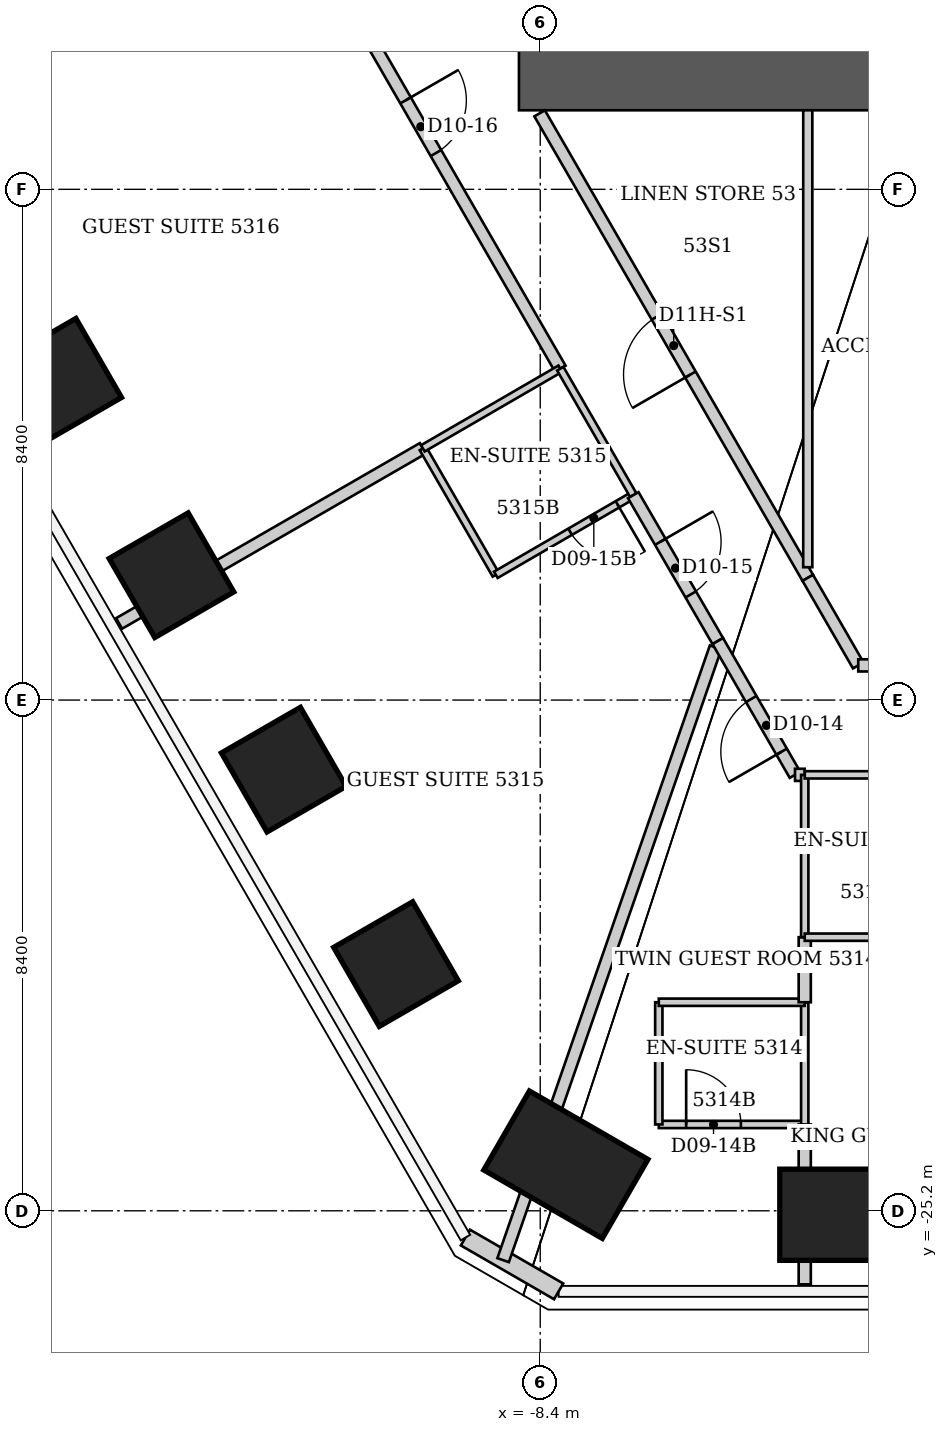
"""IFC4 building model, lengths in metres.
Left out: names, types, materials, properties, quantities, classifications, styles, units other than length and angle.
Written with IfcOpenShell. Run it as: python <this file> out.ifc"""

import sys

from ifc_helpers import new_model, si_unit, direction, frame, frame_2d, origin, origin_2d, place, context, subcontext, project, spatial, rectangle, extrude, element, fill, save


model = new_model("IFC4")
c1 = context("Model", 3, precision=1e-05, world=origin(), true_north=direction((0.0, 1.0)))
c2 = subcontext(c1, "Body", "Model", "MODEL_VIEW")
j1 = project(units=[si_unit("LENGTHUNIT", "METRE"), si_unit("PLANEANGLEUNIT", "RADIAN")], contexts=[c1])
p1 = place(None, origin())
s1 = spatial("IfcSite", under=j1, at=p1, CompositionType="ELEMENT")
p2 = place(p1, origin())
s2 = spatial("IfcBuilding", under=s1, at=p2, CompositionType="ELEMENT")
p3 = place(p2, frame((0.0, 0.0, 213.6)))
s3 = spatial("IfcBuildingStorey", under=s2, at=p3, CompositionType="ELEMENT", Elevation=213.6)
p4 = place(p3, frame((-3.71, -25.265, 0.0), z_axis=(0.0, 0.0, 1.0), x_axis=(0.0, -1.0, 0.0)))
e1 = element("IfcColumn", 1, at=p4, inside=s3, PredefinedType="COLUMN", context=c2, shape_type="SweptSolid", body=[
    extrude(rectangle(XDim=1.5, YDim=1.5, at=origin_2d()), origin(), (0.0, 0.0, 1.0), 3.8),
])
p5 = place(p3, frame((-7.979, -24.442, 0.0), z_axis=(0.0, 0.0, 1.0), x_axis=(-0.5, -0.866025403784, 0.0)))
e2 = element("IfcColumn", 2, at=p5, inside=s3, PredefinedType="COLUMN", context=c2, shape_type="SweptSolid", body=[
    extrude(rectangle(XDim=1.5, YDim=2.25, at=origin_2d()), origin(), (0.0, 0.0, 1.0), 3.8),
])
for number, where, z_axis, x_axis in (
    (3, (-10.772, -21.142, 0.0), (0.0, 0.0, 1.0), (-0.866, -0.5, 0.0)),
    (4, (-12.618, -17.945, 0.0), (0.0, 0.0, 1.0), (-0.866, -0.5, 0.0)),
    (5, (-14.465, -14.747, 0.0), (0.0, 0.0, 1.0), (-0.866, -0.5, 0.0)),
    (6, (-16.311, -11.549, 0.0), (0.0, 0.0, 1.0), (-0.866, -0.5, 0.0)),
):
    element("IfcColumn", number, at=place(p3, frame(where, z_axis=z_axis, x_axis=x_axis)), inside=s3, PredefinedType="COLUMN", context=c2, shape_type="SweptSolid", body=[
        extrude(rectangle(XDim=1.5, YDim=1.5, at=origin_2d()), origin(), (0.0, 0.0, 1.0), 3.8),
    ])
p6 = place(p3, frame((-8.75, -6.6, 0.0), z_axis=(0.0, 0.0, 1.0), x_axis=(1.0, 0.0, 0.0)))
e7 = element("IfcWall", 7, at=p6, inside=s3, PredefinedType="SHEAR", context=c2, shape_type="SweptSolid", body=[
    extrude(rectangle(XDim=17.5, YDim=1.0, at=frame_2d((8.75, 0.0))), origin(), (0.0, 0.0, 1.0), 3.8),
])
p7 = place(p3, frame((-8.097, -26.525, 0.0), z_axis=(0.0, 0.0, 1.0), x_axis=(-0.866036293601, 0.499981137809, 0.0)))
e8 = element("IfcWall", 8, at=p7, inside=s3, PredefinedType="SOLIDWALL", context=c2, shape_type="SweptSolid", body=[
    extrude(rectangle(XDim=1.77, YDim=0.3, at=frame_2d((0.885, 0.0))), origin(), (0.0, 0.0, 1.0), 3.64),
])
p8 = place(p3, frame((-15.326, -15.54, 0.0), z_axis=(0.0, 0.0, 1.0), x_axis=(0.866342721203, 0.499449986905, 0.0)))
e9 = element("IfcWall", 9, at=p8, inside=s3, PredefinedType="PARTITIONING", context=c2, shape_type="SweptSolid", body=[
    extrude(rectangle(XDim=5.767, YDim=0.2, at=frame_2d((2.883, 0.0))), origin(), (0.0, 0.0, 1.0), 3.64),
])
p9 = place(p3, frame((-12.66, -3.39, 0.0), z_axis=(0.0, 0.0, 1.0), x_axis=(0.499511590934, -0.866307203319, 0.0)))
e10 = element("IfcWall", 10, at=p9, inside=s3, PredefinedType="PARTITIONING", context=c2, shape_type="SweptSolid", body=[
    extrude(rectangle(XDim=9.189, YDim=0.2, at=frame_2d((4.594, 0.0))), origin(), (0.0, 0.0, 1.0), 3.64),
])
p10 = place(p9, frame((4.094, 0.0, 0.0)))
e11 = element("IfcOpeningElement", 11, at=p10, cuts=e10, PredefinedType="OPENING", context=c2, shape_type="SweptSolid", body=[
    extrude(rectangle(XDim=1.0, YDim=2.13, at=frame_2d((0.5, 1.065))), frame((0.0, 0.1, 0.0), z_axis=(0.0, -1.0, 0.0), x_axis=(1.0, 0.0, 0.0)), (0.0, 0.0, 1.0), 0.2),
])
p11 = place(p3, frame((-10.33, -12.66, 0.0), z_axis=(0.0, 0.0, 1.0), x_axis=(0.499693115345, -0.866202511239, 0.0)))
e12 = element("IfcWall", 12, at=p11, inside=s3, PredefinedType="PARTITIONING", context=c2, shape_type="SweptSolid", body=[
    extrude(rectangle(XDim=2.401, YDim=0.12, at=frame_2d((1.201, 0.0))), origin(), (0.0, 0.0, 1.0), 3.64),
])
p12 = place(p3, frame((-10.33, -12.66, 0.0), z_axis=(0.0, 0.0, 1.0), x_axis=(0.865195830568, 0.501434118073, 0.0)))
e13 = element("IfcWall", 13, at=p12, inside=s3, PredefinedType="PARTITIONING", context=c2, shape_type="SweptSolid", body=[
    extrude(rectangle(XDim=2.612, YDim=0.12, at=frame_2d((1.306, 0.0))), origin(), (0.0, 0.0, 1.0), 3.64),
])
p13 = place(p3, frame((-9.13, -14.74, 0.0), z_axis=(0.0, 0.0, 1.0), x_axis=(0.865131772832, 0.501544629755, 0.0)))
e14 = element("IfcWall", 14, at=p13, inside=s3, PredefinedType="PARTITIONING", context=c2, shape_type="SweptSolid", body=[
    extrude(rectangle(XDim=2.612, YDim=0.12, at=frame_2d((1.306, 0.0))), origin(), (0.0, 0.0, 1.0), 3.64),
])
p14 = place(p13, frame((1.412, 0.0, 0.0)))
e15 = element("IfcOpeningElement", 15, at=p14, cuts=e14, PredefinedType="OPENING", context=c2, shape_type="SweptSolid", body=[
    extrude(rectangle(XDim=0.9, YDim=2.03, at=frame_2d((0.45, 1.015))), frame((0.0, 0.06, 0.0), z_axis=(0.0, -1.0, 0.0), x_axis=(1.0, 0.0, 0.0)), (0.0, 0.0, 1.0), 0.12),
])
p15 = place(p3, frame((-9.01, -26.012, 0.0), z_axis=(0.0, 0.0, 1.0), x_axis=(0.327582991606, 0.944822408504, 0.0)))
e16 = element("IfcWall", 16, at=p15, inside=s3, PredefinedType="PARTITIONING", context=c2, shape_type="SweptSolid", body=[
    extrude(rectangle(XDim=10.667, YDim=0.2, at=frame_2d((5.333, 0.0))), origin(), (0.0, 0.0, 1.0), 3.64),
])
p16 = place(p3, frame((-8.07, -11.35, 0.0), z_axis=(0.0, 0.0, 1.0), x_axis=(0.499737123639, -0.866177122335, 0.0)))
e17 = element("IfcWall", 17, at=p16, inside=s3, PredefinedType="PARTITIONING", context=c2, shape_type="SweptSolid", body=[
    extrude(rectangle(XDim=2.401, YDim=0.12, at=frame_2d((1.201, 0.0))), origin(), (0.0, 0.0, 1.0), 3.64),
])
p17 = place(p3, frame((-6.87, -13.43, 0.0), z_axis=(0.0, 0.0, 1.0), x_axis=(0.501192399481, -0.865335876237, 0.0)))
e18 = element("IfcWall", 18, at=p17, inside=s3, PredefinedType="PARTITIONING", context=c2, shape_type="SweptSolid", body=[
    extrude(rectangle(XDim=2.774, YDim=0.2, at=frame_2d((1.387, 0.0))), origin(), (0.0, 0.0, 1.0), 3.64),
])
p18 = place(p17, frame((0.887, 0.0, 0.0)))
e19 = element("IfcOpeningElement", 19, at=p18, cuts=e18, PredefinedType="OPENING", context=c2, shape_type="SweptSolid", body=[
    extrude(rectangle(XDim=1.0, YDim=2.13, at=frame_2d((0.5, 1.065))), frame((0.0, 0.1, 0.0), z_axis=(0.0, -1.0, 0.0), x_axis=(1.0, 0.0, 0.0)), (0.0, 0.0, 1.0), 0.2),
])
p19 = place(p3, frame((-6.45, -23.78, 0.0), z_axis=(0.0, 0.0, 1.0), x_axis=(1.0, 0.0, 0.0)))
e20 = element("IfcWall", 20, at=p19, inside=s3, PredefinedType="PARTITIONING", context=c2, shape_type="SweptSolid", body=[
    extrude(rectangle(XDim=2.4, YDim=0.12, at=frame_2d((1.2, 0.0))), origin(), (0.0, 0.0, 1.0), 3.64),
])
p20 = place(p19, frame((0.45, 0.0, 0.0)))
e21 = element("IfcOpeningElement", 21, at=p20, cuts=e20, PredefinedType="OPENING", context=c2, shape_type="SweptSolid", body=[
    extrude(rectangle(XDim=0.9, YDim=2.03, at=frame_2d((0.45, 1.015))), frame((0.0, 0.06, 0.0), z_axis=(0.0, -1.0, 0.0), x_axis=(1.0, 0.0, 0.0)), (0.0, 0.0, 1.0), 0.12),
])
p21 = place(p3, frame((-6.45, -21.77, 0.0), z_axis=(0.0, 0.0, 1.0), x_axis=(0.0, -1.0, 0.0)))
e22 = element("IfcWall", 22, at=p21, inside=s3, PredefinedType="PARTITIONING", context=c2, shape_type="SweptSolid", body=[
    extrude(rectangle(XDim=2.01, YDim=0.12, at=frame_2d((1.005, 0.0))), origin(), (0.0, 0.0, 1.0), 3.64),
])
p22 = place(p3, frame((-5.48, -15.83, 0.0), z_axis=(0.0, 0.0, 1.0), x_axis=(0.499963722229, -0.866046347752, 0.0)))
e23 = element("IfcWall", 23, at=p22, inside=s3, PredefinedType="PARTITIONING", context=c2, shape_type="SweptSolid", body=[
    extrude(rectangle(XDim=2.54, YDim=0.2, at=frame_2d((1.27, 0.0))), origin(), (0.0, 0.0, 1.0), 3.64),
])
p23 = place(p22, frame((1.1, 0.0, 0.0)))
e24 = element("IfcOpeningElement", 24, at=p23, cuts=e23, PredefinedType="OPENING", context=c2, shape_type="SweptSolid", body=[
    extrude(rectangle(XDim=1.0, YDim=2.13, at=frame_2d((0.5, 1.065))), frame((0.0, 0.1, 0.0), z_axis=(0.0, -1.0, 0.0), x_axis=(1.0, 0.0, 0.0)), (0.0, 0.0, 1.0), 0.2),
])
p24 = place(p3, frame((-4.21, -18.03, 0.0), z_axis=(0.0, 0.0, 1.0), x_axis=(1.0, 0.0, 0.0)))
e25 = element("IfcWall", 25, at=p24, inside=s3, PredefinedType="PARTITIONING", context=c2, shape_type="SweptSolid", body=[
    extrude(rectangle(XDim=0.16, YDim=0.2, at=frame_2d((0.08, 0.0))), origin(), (0.0, 0.0, 1.0), 3.64),
])
p25 = place(p3, frame((-4.05, -26.41, 0.0), z_axis=(0.0, 0.0, 1.0), x_axis=(0.0, 1.0, 0.0)))
e26 = element("IfcWall", 26, at=p25, inside=s3, PredefinedType="PARTITIONING", context=c2, shape_type="SweptSolid", body=[
    extrude(rectangle(XDim=2.63, YDim=0.2, at=frame_2d((1.315, 0.0))), origin(), (0.0, 0.0, 1.0), 3.64),
])
p26 = place(p3, frame((-4.05, -23.78, 0.0), z_axis=(0.0, 0.0, 1.0), x_axis=(0.0, 1.0, 0.0)))
e27 = element("IfcWall", 27, at=p26, inside=s3, PredefinedType="PARTITIONING", context=c2, shape_type="SweptSolid", body=[
    extrude(rectangle(XDim=2.01, YDim=0.12, at=frame_2d((1.005, 0.0))), origin(), (0.0, 0.0, 1.0), 3.64),
])
p27 = place(p3, frame((-4.05, -21.77, 0.0), z_axis=(0.0, 0.0, 1.0), x_axis=(-1.0, 0.0, 0.0)))
e28 = element("IfcWall", 28, at=p27, inside=s3, PredefinedType="PARTITIONING", context=c2, shape_type="SweptSolid", body=[
    extrude(rectangle(XDim=2.4, YDim=0.12, at=frame_2d((1.2, 0.0))), origin(), (0.0, 0.0, 1.0), 3.64),
])
p28 = place(p3, frame((-4.05, -21.77, 0.0), z_axis=(0.0, 0.0, 1.0), x_axis=(0.0, 1.0, 0.0)))
e29 = element("IfcWall", 29, at=p28, inside=s3, PredefinedType="PARTITIONING", context=c2, shape_type="SweptSolid", body=[
    extrude(rectangle(XDim=1.07, YDim=0.2, at=frame_2d((0.535, 0.0))), origin(), (0.0, 0.0, 1.0), 3.64),
])
p29 = place(p3, frame((-4.05, -20.7, 0.0), z_axis=(0.0, 0.0, 1.0), x_axis=(0.0, 1.0, 0.0)))
e30 = element("IfcWall", 30, at=p29, inside=s3, PredefinedType="PARTITIONING", context=c2, shape_type="SweptSolid", body=[
    extrude(rectangle(XDim=2.67, YDim=0.12, at=frame_2d((1.335, 0.0))), origin(), (0.0, 0.0, 1.0), 3.64),
])
for number, where, z_axis, x_axis in (
    (31, (-4.05, -20.7, 0.0), (0.0, 0.0, 1.0), (1.0, 0.0, 0.0)),
    (32, (-4.05, -18.03, 0.0), (0.0, 0.0, 1.0), (1.0, 0.0, 0.0)),
):
    element("IfcWall", number, at=place(p3, frame(where, z_axis=z_axis, x_axis=x_axis)), inside=s3, PredefinedType="PARTITIONING", context=c2, shape_type="SweptSolid", body=[
        extrude(rectangle(XDim=2.45, YDim=0.12, at=frame_2d((1.225, 0.0))), origin(), (0.0, 0.0, 1.0), 3.64),
    ])
p30 = place(p3, frame((-4.0, -14.79, 0.0), z_axis=(0.0, 0.0, 1.0), x_axis=(-0.499916512745, 0.866073599808, 0.0)))
e33 = element("IfcWall", 33, at=p30, inside=s3, PredefinedType="PARTITIONING", context=c2, shape_type="SweptSolid", body=[
    extrude(rectangle(XDim=8.821, YDim=0.2, at=frame_2d((4.411, 0.0))), origin(), (0.0, 0.0, 1.0), 3.64),
])
p31 = place(p30, frame((3.861, 0.0, 0.0)))
e34 = element("IfcOpeningElement", 34, at=p31, cuts=e33, PredefinedType="OPENING", context=c2, shape_type="SweptSolid", body=[
    extrude(rectangle(XDim=1.1, YDim=2.2, at=frame_2d((0.55, 1.1))), frame((0.0, 0.1, 0.0), z_axis=(0.0, -1.0, 0.0), x_axis=(1.0, 0.0, 0.0)), (0.0, 0.0, 1.0), 0.2),
])
p32 = place(p3, frame((-4.0, -7.1, 0.0), z_axis=(0.0, 0.0, 1.0), x_axis=(0.0, -1.0, 0.0)))
e35 = element("IfcWall", 35, at=p32, inside=s3, PredefinedType="PARTITIONING", context=c2, shape_type="SweptSolid", body=[
    extrude(rectangle(XDim=7.515, YDim=0.15, at=frame_2d((3.757, 0.0))), origin(), (0.0, 0.0, 1.0), 3.64),
])
p33 = place(p3, frame((-3.17, -16.23, 0.0), z_axis=(0.0, 0.0, 1.0), x_axis=(-0.499425709803, 0.866356716594, 0.0)))
e36 = element("IfcWall", 36, at=p33, inside=s3, PredefinedType="PARTITIONING", context=c2, shape_type="SweptSolid", body=[
    extrude(rectangle(XDim=1.662, YDim=0.2, at=frame_2d((0.831, 0.0))), origin(), (0.0, 0.0, 1.0), 3.64),
])
p34 = place(p3, frame((-1.2, -16.23, 0.0), z_axis=(0.0, 0.0, 1.0), x_axis=(-1.0, 0.0, 0.0)))
e37 = element("IfcWall", 37, at=p34, inside=s3, PredefinedType="PARTITIONING", context=c2, shape_type="SweptSolid", body=[
    extrude(rectangle(XDim=1.97, YDim=0.2, at=frame_2d((0.985, 0.0))), origin(), (0.0, 0.0, 1.0), 3.64),
])
p35 = place(p34, frame((0.435, 0.0, 0.0)))
e38 = element("IfcOpeningElement", 38, at=p35, cuts=e37, PredefinedType="OPENING", context=c2, shape_type="SweptSolid", body=[
    extrude(rectangle(XDim=1.1, YDim=2.2, at=frame_2d((0.55, 1.1))), frame((0.0, 0.1, 0.0), z_axis=(0.0, -1.0, 0.0), x_axis=(1.0, 0.0, 0.0)), (0.0, 0.0, 1.0), 0.2),
])
p36 = place(p23, origin())
e39 = element("IfcDoor", 39, at=p36, inside=s3, OperationType="SINGLE_SWING_RIGHT", PredefinedType="DOOR", context=c2, shape_type="SweptSolid", body=[
    extrude(rectangle(XDim=1.0, YDim=2.13, at=frame_2d((0.5, 1.065))), frame((0.0, 0.025, 0.0), z_axis=(0.0, -1.0, 0.0), x_axis=(1.0, 0.0, 0.0)), (0.0, 0.0, 1.0), 0.05),
])
fill(e24, e39)
p37 = place(p20, origin())
e40 = element("IfcDoor", 40, at=p37, inside=s3, OperationType="SINGLE_SWING_LEFT", PredefinedType="DOOR", context=c2, shape_type="SweptSolid", body=[
    extrude(rectangle(XDim=0.9, YDim=2.03, at=frame_2d((0.45, 1.015))), frame((0.0, 0.025, 0.0), z_axis=(0.0, -1.0, 0.0), x_axis=(1.0, 0.0, 0.0)), (0.0, 0.0, 1.0), 0.05),
])
fill(e21, e40)
p38 = place(p18, origin())
e41 = element("IfcDoor", 41, at=p38, inside=s3, OperationType="SINGLE_SWING_LEFT", PredefinedType="DOOR", context=c2, shape_type="SweptSolid", body=[
    extrude(rectangle(XDim=1.0, YDim=2.13, at=frame_2d((0.5, 1.065))), frame((0.0, 0.025, 0.0), z_axis=(0.0, -1.0, 0.0), x_axis=(1.0, 0.0, 0.0)), (0.0, 0.0, 1.0), 0.05),
])
fill(e19, e41)
p39 = place(p14, origin())
e42 = element("IfcDoor", 42, at=p39, inside=s3, OperationType="SINGLE_SWING_RIGHT", PredefinedType="DOOR", context=c2, shape_type="SweptSolid", body=[
    extrude(rectangle(XDim=0.9, YDim=2.03, at=frame_2d((0.45, 1.015))), frame((0.0, 0.025, 0.0), z_axis=(0.0, -1.0, 0.0), x_axis=(1.0, 0.0, 0.0)), (0.0, 0.0, 1.0), 0.05),
])
fill(e15, e42)
p40 = place(p10, origin())
e43 = element("IfcDoor", 43, at=p40, inside=s3, OperationType="SINGLE_SWING_LEFT", PredefinedType="DOOR", context=c2, shape_type="SweptSolid", body=[
    extrude(rectangle(XDim=1.0, YDim=2.13, at=frame_2d((0.5, 1.065))), frame((0.0, 0.025, 0.0), z_axis=(0.0, -1.0, 0.0), x_axis=(1.0, 0.0, 0.0)), (0.0, 0.0, 1.0), 0.05),
])
fill(e11, e43)
p41 = place(p31, origin())
e44 = element("IfcDoor", 44, at=p41, inside=s3, OperationType="SINGLE_SWING_LEFT", PredefinedType="DOOR", context=c2, shape_type="SweptSolid", body=[
    extrude(rectangle(XDim=1.1, YDim=2.2, at=frame_2d((0.55, 1.1))), frame((0.0, 0.025, 0.0), z_axis=(0.0, -1.0, 0.0), x_axis=(1.0, 0.0, 0.0)), (0.0, 0.0, 1.0), 0.05),
])
fill(e34, e44)
save(model, sys.argv[1])
